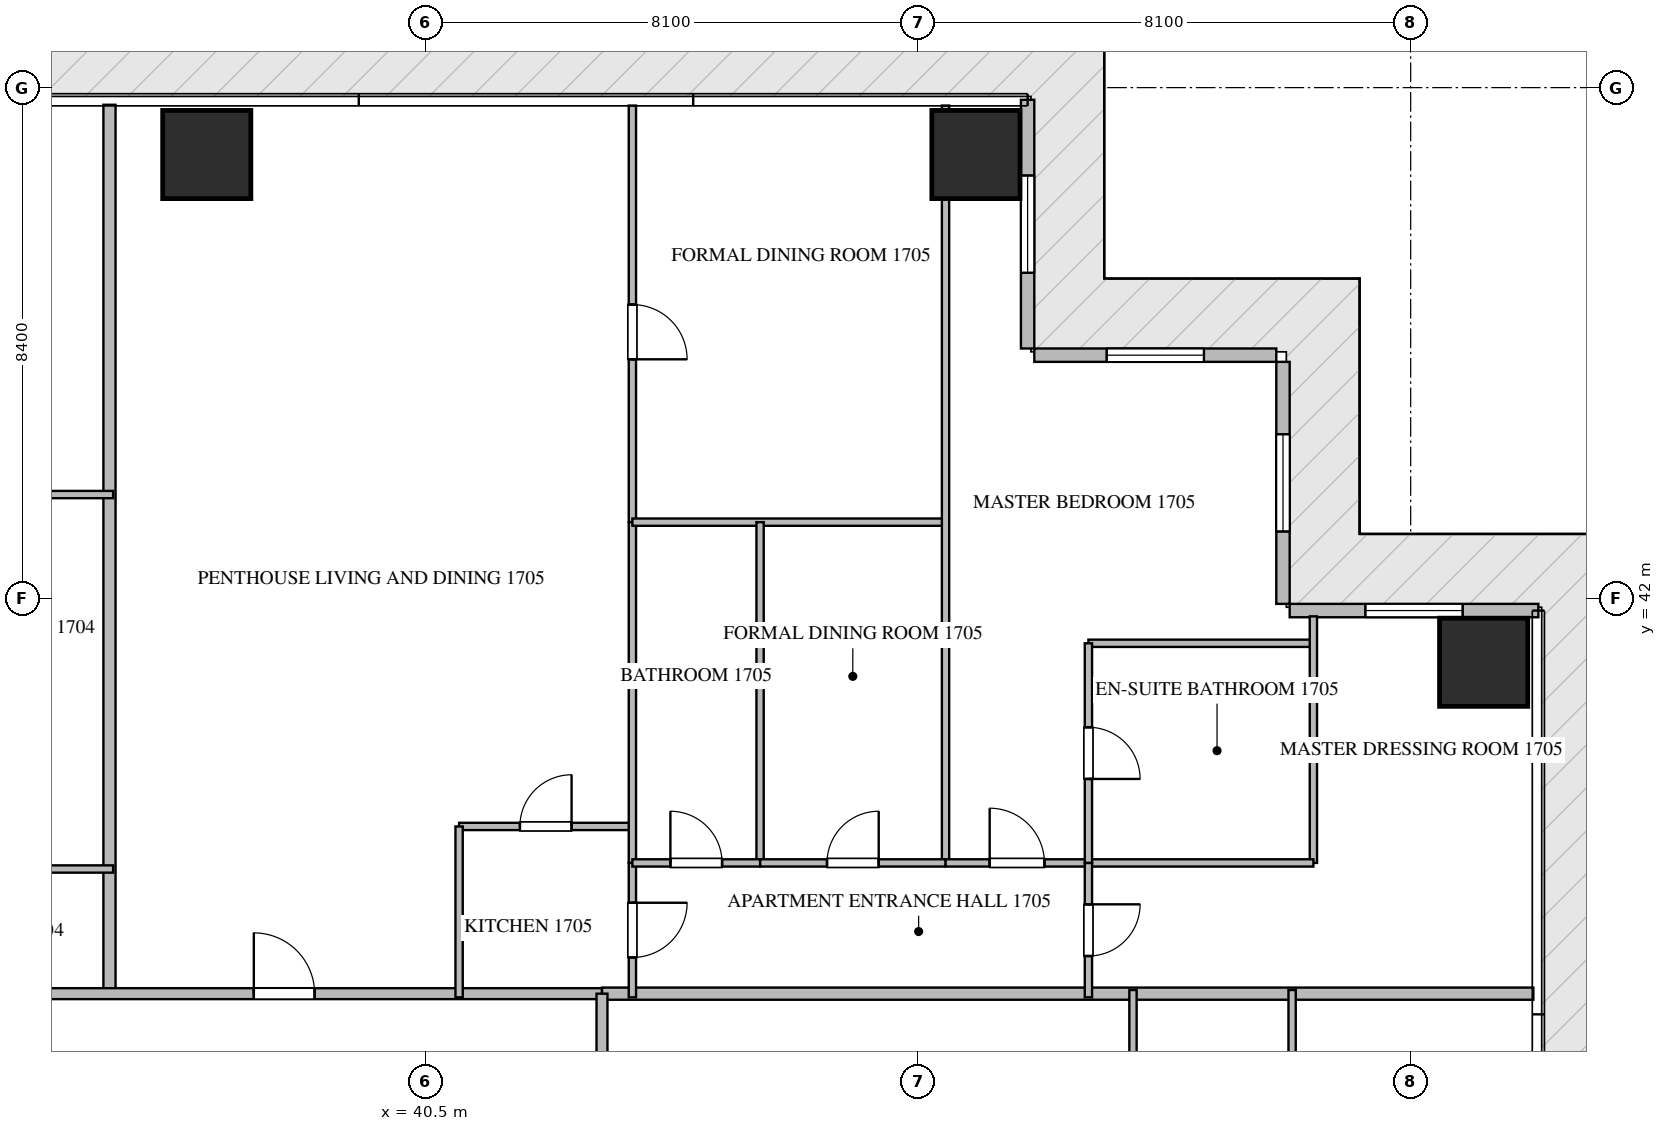
"""IFC4 building model, lengths in metres.
Left out: names, types, materials, properties, quantities, classifications, styles, units other than length and angle.
Written with IfcOpenShell. Run it as: python <this file> out.ifc"""

import sys

from ifc_helpers import new_model, si_unit, direction, frame, frame_2d, origin, origin_2d, place, context, subcontext, project, spatial, rectangle, extrude, source, transform, mapped, element, fill, save


model = new_model("IFC4")
c1 = context("Model", 3, precision=1e-05, world=origin(), true_north=direction((0.0, 1.0)))
c2 = subcontext(c1, "Body", "Model", "MODEL_VIEW")
j1 = project(units=[si_unit("LENGTHUNIT", "METRE"), si_unit("PLANEANGLEUNIT", "RADIAN")], contexts=[c1])
p1 = place(None, origin())
s1 = spatial("IfcSite", under=j1, at=p1, CompositionType="ELEMENT")
p2 = place(p1, origin())
s2 = spatial("IfcBuilding", under=s1, at=p2, CompositionType="ELEMENT")
p3 = place(p2, frame((0.0, 0.0, 71.7)))
s3 = spatial("IfcBuildingStorey", under=s2, at=p3, CompositionType="ELEMENT", Elevation=71.7)
m1 = source(origin(), c2, "Body", "SweptSolid", [
    extrude(rectangle(XDim=1.45, YDim=1.45, at=origin_2d()), origin(), (0.0, 0.0, 1.0), 3.75),
])
for number, where, z_axis, x_axis in (
    (1, (36.9, 49.3, -0.26), (0.0, 0.0, 1.0), (1.0, 0.0, 0.0)),
    (2, (49.55, 49.3, -0.26), (0.0, 0.0, 1.0), (1.0, 0.0, 0.0)),
    (3, (57.9, 40.95, -0.26), (0.0, 0.0, 1.0), (1.0, 0.0, 0.0)),
):
    element("IfcColumn", number, at=place(p3, frame(where, z_axis=z_axis, x_axis=x_axis)), inside=s3, PredefinedType="COLUMN", context=c2, shape_type="MappedRepresentation", body=[
        mapped(m1, transform((0.0, 0.0, 0.0), scale=1.0)),
    ])
p4 = place(p3, frame((58.8, 41.8, 0.0), z_axis=(0.0, 0.0, 1.0), x_axis=(-1.0, 0.0, 0.0)))
e4 = element("IfcWall", 4, at=p4, inside=s3, PredefinedType="ELEMENTEDWALL", context=c2, shape_type="SweptSolid", body=[
    extrude(rectangle(XDim=4.09, YDim=0.22, at=frame_2d((2.045, 0.0))), origin(), (0.0, 0.0, 1.0), 3.475),
])
p5 = place(p4, frame((1.245, 0.0, 0.65)))
e5 = element("IfcOpeningElement", 5, at=p5, cuts=e4, PredefinedType="OPENING", context=c2, shape_type="SweptSolid", body=[
    extrude(rectangle(XDim=1.6, YDim=2.1, at=frame_2d((0.8, 1.05))), frame((0.0, 0.12, 0.0), z_axis=(0.0, -1.0, 0.0), x_axis=(1.0, 0.0, 0.0)), (0.0, 0.0, 1.0), 0.24),
])
p6 = place(p3, frame((54.6, 41.91, 0.0), z_axis=(0.0, 0.0, 1.0), x_axis=(0.0, 1.0, 0.0)))
e6 = element("IfcWall", 6, at=p6, inside=s3, PredefinedType="ELEMENTEDWALL", context=c2, shape_type="SweptSolid", body=[
    extrude(rectangle(XDim=3.98, YDim=0.22, at=frame_2d((1.99, 0.0))), origin(), (0.0, 0.0, 1.0), 3.475),
])
p7 = place(p6, frame((1.19, 0.0, 0.65)))
e7 = element("IfcOpeningElement", 7, at=p7, cuts=e6, PredefinedType="OPENING", context=c2, shape_type="SweptSolid", body=[
    extrude(rectangle(XDim=1.6, YDim=2.1, at=frame_2d((0.8, 1.05))), frame((0.0, 0.12, 0.0), z_axis=(0.0, -1.0, 0.0), x_axis=(1.0, 0.0, 0.0)), (0.0, 0.0, 1.0), 0.24),
])
p8 = place(p3, frame((54.49, 46.0, 0.0), z_axis=(0.0, 0.0, 1.0), x_axis=(-1.0, 0.0, 0.0)))
e8 = element("IfcWall", 8, at=p8, inside=s3, PredefinedType="ELEMENTEDWALL", context=c2, shape_type="SweptSolid", body=[
    extrude(rectangle(XDim=3.98, YDim=0.22, at=frame_2d((1.99, 0.0))), origin(), (0.0, 0.0, 1.0), 3.475),
])
p9 = place(p8, frame((1.19, 0.0, 0.65)))
e9 = element("IfcOpeningElement", 9, at=p9, cuts=e8, PredefinedType="OPENING", context=c2, shape_type="SweptSolid", body=[
    extrude(rectangle(XDim=1.6, YDim=2.1, at=frame_2d((0.8, 1.05))), frame((0.0, 0.12, 0.0), z_axis=(0.0, -1.0, 0.0), x_axis=(1.0, 0.0, 0.0)), (0.0, 0.0, 1.0), 0.24),
])
p10 = place(p3, frame((50.4, 46.11, 0.0), z_axis=(0.0, 0.0, 1.0), x_axis=(0.0, 1.0, 0.0)))
e10 = element("IfcWall", 10, at=p10, inside=s3, PredefinedType="ELEMENTEDWALL", context=c2, shape_type="SweptSolid", body=[
    extrude(rectangle(XDim=4.09, YDim=0.22, at=frame_2d((2.045, 0.0))), origin(), (0.0, 0.0, 1.0), 3.475),
])
p11 = place(p10, frame((1.245, 0.0, 0.65)))
e11 = element("IfcOpeningElement", 11, at=p11, cuts=e10, PredefinedType="OPENING", context=c2, shape_type="SweptSolid", body=[
    extrude(rectangle(XDim=1.6, YDim=2.1, at=frame_2d((0.8, 1.05))), frame((0.0, 0.12, 0.0), z_axis=(0.0, -1.0, 0.0), x_axis=(1.0, 0.0, 0.0)), (0.0, 0.0, 1.0), 0.24),
])
p12 = place(p3, frame((35.3, 35.5, 0.0), z_axis=(0.0, 0.0, 1.0), x_axis=(0.0, 1.0, 0.0)))
e12 = element("IfcWall", 12, at=p12, inside=s3, PredefinedType="PARTITIONING", context=c2, shape_type="SweptSolid", body=[
    extrude(rectangle(XDim=14.618, YDim=0.2, at=frame_2d((7.309, 0.0))), origin(), (0.0, 0.0, 1.0), 3.49),
])
p13 = place(p3, frame((43.4, 35.5, 0.0), z_axis=(0.0, 0.0, 1.0), x_axis=(1.0, 0.0, 0.0)))
e13 = element("IfcWall", 13, at=p13, inside=s3, PredefinedType="PARTITIONING", context=c2, shape_type="SweptSolid", body=[
    extrude(rectangle(XDim=15.318, YDim=0.2, at=frame_2d((7.659, 0.0))), origin(), (0.0, 0.0, 1.0), 3.49),
])
p14 = place(p3, frame((21.402, 35.5, 0.0), z_axis=(0.0, 0.0, 1.0), x_axis=(1.0, 0.0, 0.0)))
e14 = element("IfcWall", 14, at=p14, inside=s3, PredefinedType="PARTITIONING", context=c2, shape_type="SweptSolid", body=[
    extrude(rectangle(XDim=21.996, YDim=0.18, at=frame_2d((10.998, 0.0))), origin(), (0.0, 0.0, 1.0), 3.49),
])
p15 = place(p14, frame((5.774, 0.0, 0.0)))
e15 = element("IfcOpeningElement", 15, at=p15, cuts=e14, PredefinedType="OPENING", context=c2, shape_type="SweptSolid", body=[
    extrude(rectangle(XDim=1.0, YDim=2.15, at=frame_2d((0.5, 1.075))), frame((0.0, 0.1, 0.0), z_axis=(0.0, -1.0, 0.0), x_axis=(1.0, 0.0, 0.0)), (0.0, 0.0, 1.0), 0.2),
])
p16 = place(p14, frame((16.272, 0.0, 0.0)))
e16 = element("IfcOpeningElement", 16, at=p16, cuts=e14, PredefinedType="OPENING", context=c2, shape_type="SweptSolid", body=[
    extrude(rectangle(XDim=1.0, YDim=2.15, at=frame_2d((0.5, 1.075))), frame((0.0, 0.1, 0.0), z_axis=(0.0, -1.0, 0.0), x_axis=(1.0, 0.0, 0.0)), (0.0, 0.0, 1.0), 0.2),
])
p17 = place(p3, frame((43.4, 14.9, 0.0), z_axis=(0.0, 0.0, 1.0), x_axis=(0.0, 1.0, 0.0)))
e17 = element("IfcWall", 17, at=p17, inside=s3, PredefinedType="PARTITIONING", context=c2, shape_type="SweptSolid", body=[
    extrude(rectangle(XDim=20.6, YDim=0.18, at=frame_2d((10.3, 0.0))), origin(), (0.0, 0.0, 1.0), 3.49),
])
p18 = place(p17, frame((1.96, 0.0, 0.0)))
e18 = element("IfcOpeningElement", 18, at=p18, cuts=e17, PredefinedType="OPENING", context=c2, shape_type="SweptSolid", body=[
    extrude(rectangle(XDim=1.0, YDim=2.15, at=frame_2d((0.5, 1.075))), frame((0.0, 0.1, 0.0), z_axis=(0.0, -1.0, 0.0), x_axis=(1.0, 0.0, 0.0)), (0.0, 0.0, 1.0), 0.2),
])
for number, where, z_axis, x_axis in (
    (19, (30.56, 43.708, 0.0), (0.0, 0.0, 1.0), (1.0, 0.0, 0.0)),
    (20, (30.56, 37.55, 0.0), (0.0, 0.0, 1.0), (1.0, 0.0, 0.0)),
):
    element("IfcWall", number, at=place(p3, frame(where, z_axis=z_axis, x_axis=x_axis)), inside=s3, PredefinedType="PARTITIONING", context=c2, shape_type="SweptSolid", body=[
        extrude(rectangle(XDim=4.8, YDim=0.12, at=frame_2d((2.4, 0.0))), origin(), (0.0, 0.0, 1.0), 3.49),
    ])
p19 = place(p3, frame((41.05, 38.25, 0.0), z_axis=(0.0, 0.0, 1.0), x_axis=(1.0, 0.0, 0.0)))
e21 = element("IfcWall", 21, at=p19, inside=s3, PredefinedType="PARTITIONING", context=c2, shape_type="SweptSolid", body=[
    extrude(rectangle(XDim=2.85, YDim=0.12, at=frame_2d((1.425, 0.0))), origin(), (0.0, 0.0, 1.0), 3.49),
])
p20 = place(p19, frame((1.0, 0.0, 0.0)))
e22 = element("IfcOpeningElement", 22, at=p20, cuts=e21, PredefinedType="OPENING", context=c2, shape_type="SweptSolid", body=[
    extrude(rectangle(XDim=0.85, YDim=2.1, at=frame_2d((0.425, 1.05))), frame((0.0, 0.07, 0.0), z_axis=(0.0, -1.0, 0.0), x_axis=(1.0, 0.0, 0.0)), (0.0, 0.0, 1.0), 0.14),
])
p21 = place(p3, frame((41.05, 38.25, 0.0), z_axis=(0.0, 0.0, 1.0), x_axis=(0.0, -1.0, 0.0)))
e23 = element("IfcWall", 23, at=p21, inside=s3, PredefinedType="PARTITIONING", context=c2, shape_type="SweptSolid", body=[
    extrude(rectangle(XDim=2.81, YDim=0.12, at=frame_2d((1.405, 0.0))), origin(), (0.0, 0.0, 1.0), 3.49),
])
p22 = place(p3, frame((43.9, 37.65, 0.0), z_axis=(0.0, 0.0, 1.0), x_axis=(0.0, -1.0, 0.0)))
e24 = element("IfcWall", 24, at=p22, inside=s3, PredefinedType="PARTITIONING", context=c2, shape_type="SweptSolid", body=[
    extrude(rectangle(XDim=2.21, YDim=0.12, at=frame_2d((1.105, 0.0))), origin(), (0.0, 0.0, 1.0), 3.49),
])
p23 = place(p22, frame((0.655, 0.0, 0.0)))
e25 = element("IfcOpeningElement", 25, at=p23, cuts=e24, PredefinedType="OPENING", context=c2, shape_type="SweptSolid", body=[
    extrude(rectangle(XDim=0.9, YDim=2.1, at=frame_2d((0.45, 1.05))), frame((0.0, 0.07, 0.0), z_axis=(0.0, -1.0, 0.0), x_axis=(1.0, 0.0, 0.0)), (0.0, 0.0, 1.0), 0.14),
])
p24 = place(p3, frame((43.9, 50.105, 0.0), z_axis=(0.0, 0.0, 1.0), x_axis=(0.0, -1.0, 0.0)))
e26 = element("IfcWall", 26, at=p24, inside=s3, PredefinedType="PARTITIONING", context=c2, shape_type="SweptSolid", body=[
    extrude(rectangle(XDim=6.851, YDim=0.12, at=frame_2d((3.426, 0.0))), origin(), (0.0, 0.0, 1.0), 3.49),
])
p25 = place(p24, frame((3.273, 0.0, 0.0)))
e27 = element("IfcOpeningElement", 27, at=p25, cuts=e26, PredefinedType="OPENING", context=c2, shape_type="SweptSolid", body=[
    extrude(rectangle(XDim=0.9, YDim=2.1, at=frame_2d((0.45, 1.05))), frame((0.0, 0.07, 0.0), z_axis=(0.0, -1.0, 0.0), x_axis=(1.0, 0.0, 0.0)), (0.0, 0.0, 1.0), 0.14),
])
p26 = place(p3, frame((43.9, 43.252, 0.0), z_axis=(0.0, 0.0, 1.0), x_axis=(0.0, -1.0, 0.0)))
e28 = element("IfcWall", 28, at=p26, inside=s3, PredefinedType="PARTITIONING", context=c2, shape_type="SweptSolid", body=[
    extrude(rectangle(XDim=5.6, YDim=0.12, at=frame_2d((2.8, 0.0))), origin(), (0.0, 0.0, 1.0), 3.49),
])
p27 = place(p3, frame((43.9, 43.254, 0.0), z_axis=(0.0, 0.0, 1.0), x_axis=(1.0, 0.0, 0.0)))
e29 = element("IfcWall", 29, at=p27, inside=s3, PredefinedType="PARTITIONING", context=c2, shape_type="SweptSolid", body=[
    extrude(rectangle(XDim=5.15, YDim=0.12, at=frame_2d((2.575, 0.0))), origin(), (0.0, 0.0, 1.0), 3.49),
])
p28 = place(p3, frame((49.05, 50.105, 0.0), z_axis=(0.0, 0.0, 1.0), x_axis=(0.0, -1.0, 0.0)))
e30 = element("IfcWall", 30, at=p28, inside=s3, PredefinedType="PARTITIONING", context=c2, shape_type="SweptSolid", body=[
    extrude(rectangle(XDim=12.455, YDim=0.12, at=frame_2d((6.228, 0.0))), origin(), (0.0, 0.0, 1.0), 3.49),
])
p29 = place(p3, frame((46.0, 43.254, 0.0), z_axis=(0.0, 0.0, 1.0), x_axis=(0.0, -1.0, 0.0)))
e31 = element("IfcWall", 31, at=p29, inside=s3, PredefinedType="PARTITIONING", context=c2, shape_type="SweptSolid", body=[
    extrude(rectangle(XDim=5.604, YDim=0.12, at=frame_2d((2.802, 0.0))), origin(), (0.0, 0.0, 1.0), 3.49),
])
p30 = place(p3, frame((43.9, 37.65, 0.0), z_axis=(0.0, 0.0, 1.0), x_axis=(1.0, 0.0, 0.0)))
e32 = element("IfcWall", 32, at=p30, inside=s3, PredefinedType="PARTITIONING", context=c2, shape_type="SweptSolid", body=[
    extrude(rectangle(XDim=2.1, YDim=0.12, at=frame_2d((1.05, 0.0))), origin(), (0.0, 0.0, 1.0), 3.49),
])
p31 = place(p30, frame((0.625, 0.0, 0.0)))
e33 = element("IfcOpeningElement", 33, at=p31, cuts=e32, PredefinedType="OPENING", context=c2, shape_type="SweptSolid", body=[
    extrude(rectangle(XDim=0.85, YDim=2.1, at=frame_2d((0.425, 1.05))), frame((0.0, 0.07, 0.0), z_axis=(0.0, -1.0, 0.0), x_axis=(1.0, 0.0, 0.0)), (0.0, 0.0, 1.0), 0.14),
])
p32 = place(p3, frame((46.002, 37.65, 0.0), z_axis=(0.0, 0.0, 1.0), x_axis=(1.0, 0.0, 0.0)))
e34 = element("IfcWall", 34, at=p32, inside=s3, PredefinedType="PARTITIONING", context=c2, shape_type="SweptSolid", body=[
    extrude(rectangle(XDim=3.048, YDim=0.12, at=frame_2d((1.524, 0.0))), origin(), (0.0, 0.0, 1.0), 3.49),
])
p33 = place(p32, frame((1.099, 0.0, 0.0)))
e35 = element("IfcOpeningElement", 35, at=p33, cuts=e34, PredefinedType="OPENING", context=c2, shape_type="SweptSolid", body=[
    extrude(rectangle(XDim=0.85, YDim=2.1, at=frame_2d((0.425, 1.05))), frame((0.0, 0.07, 0.0), z_axis=(0.0, -1.0, 0.0), x_axis=(1.0, 0.0, 0.0)), (0.0, 0.0, 1.0), 0.14),
])
p34 = place(p3, frame((49.052, 37.65, 0.0), z_axis=(0.0, 0.0, 1.0), x_axis=(1.0, 0.0, 0.0)))
e36 = element("IfcWall", 36, at=p34, inside=s3, PredefinedType="PARTITIONING", context=c2, shape_type="SweptSolid", body=[
    extrude(rectangle(XDim=2.348, YDim=0.12, at=frame_2d((1.174, 0.0))), origin(), (0.0, 0.0, 1.0), 3.49),
])
p35 = place(p34, frame((0.724, 0.0, 0.0)))
e37 = element("IfcOpeningElement", 37, at=p35, cuts=e36, PredefinedType="OPENING", context=c2, shape_type="SweptSolid", body=[
    extrude(rectangle(XDim=0.9, YDim=2.1, at=frame_2d((0.45, 1.05))), frame((0.0, 0.07, 0.0), z_axis=(0.0, -1.0, 0.0), x_axis=(1.0, 0.0, 0.0)), (0.0, 0.0, 1.0), 0.14),
])
p36 = place(p3, frame((51.4, 41.262, 0.0), z_axis=(0.0, 0.0, 1.0), x_axis=(1.0, 0.0, 0.0)))
e38 = element("IfcWall", 38, at=p36, inside=s3, PredefinedType="PARTITIONING", context=c2, shape_type="SweptSolid", body=[
    extrude(rectangle(XDim=3.7, YDim=0.12, at=frame_2d((1.85, 0.0))), origin(), (0.0, 0.0, 1.0), 3.49),
])
p37 = place(p3, frame((55.1, 41.705, 0.0), z_axis=(0.0, 0.0, 1.0), x_axis=(0.0, -1.0, 0.0)))
e39 = element("IfcWall", 39, at=p37, inside=s3, PredefinedType="PARTITIONING", context=c2, shape_type="SweptSolid", body=[
    extrude(rectangle(XDim=4.055, YDim=0.12, at=frame_2d((2.028, 0.0))), origin(), (0.0, 0.0, 1.0), 3.49),
])
p38 = place(p3, frame((51.402, 37.65, 0.0), z_axis=(0.0, 0.0, 1.0), x_axis=(1.0, 0.0, 0.0)))
e40 = element("IfcWall", 40, at=p38, inside=s3, PredefinedType="PARTITIONING", context=c2, shape_type="SweptSolid", body=[
    extrude(rectangle(XDim=3.698, YDim=0.12, at=frame_2d((1.849, 0.0))), origin(), (0.0, 0.0, 1.0), 3.49),
])
p39 = place(p3, frame((51.4, 41.262, 0.0), z_axis=(0.0, 0.0, 1.0), x_axis=(0.0, -1.0, 0.0)))
e41 = element("IfcWall", 41, at=p39, inside=s3, PredefinedType="PARTITIONING", context=c2, shape_type="SweptSolid", body=[
    extrude(rectangle(XDim=3.612, YDim=0.12, at=frame_2d((1.806, 0.0))), origin(), (0.0, 0.0, 1.0), 3.49),
])
p40 = place(p39, frame((1.381, 0.0, 0.0)))
e42 = element("IfcOpeningElement", 42, at=p40, cuts=e41, PredefinedType="OPENING", context=c2, shape_type="SweptSolid", body=[
    extrude(rectangle(XDim=0.85, YDim=2.1, at=frame_2d((0.425, 1.05))), frame((0.0, 0.07, 0.0), z_axis=(0.0, -1.0, 0.0), x_axis=(1.0, 0.0, 0.0)), (0.0, 0.0, 1.0), 0.14),
])
p41 = place(p3, frame((51.4, 37.648, 0.0), z_axis=(0.0, 0.0, 1.0), x_axis=(0.0, -1.0, 0.0)))
e43 = element("IfcWall", 43, at=p41, inside=s3, PredefinedType="PARTITIONING", context=c2, shape_type="SweptSolid", body=[
    extrude(rectangle(XDim=2.208, YDim=0.12, at=frame_2d((1.104, 0.0))), origin(), (0.0, 0.0, 1.0), 3.49),
])
p42 = place(p41, frame((0.679, 0.0, 0.0)))
e44 = element("IfcOpeningElement", 44, at=p42, cuts=e43, PredefinedType="OPENING", context=c2, shape_type="SweptSolid", body=[
    extrude(rectangle(XDim=0.85, YDim=2.1, at=frame_2d((0.425, 1.05))), frame((0.0, 0.07, 0.0), z_axis=(0.0, -1.0, 0.0), x_axis=(1.0, 0.0, 0.0)), (0.0, 0.0, 1.0), 0.14),
])
for number, where, z_axis, x_axis in (
    (45, (54.75, 30.15, 0.0), (0.0, 0.0, 1.0), (0.0, 1.0, 0.0)),
    (46, (52.133, 30.15, 0.0), (0.0, 0.0, 1.0), (0.0, 1.0, 0.0)),
):
    element("IfcWall", number, at=place(p3, frame(where, z_axis=z_axis, x_axis=x_axis)), inside=s3, PredefinedType="PARTITIONING", context=c2, shape_type="SweptSolid", body=[
        extrude(rectangle(XDim=5.41, YDim=0.12, at=frame_2d((2.705, 0.0))), origin(), (0.0, 0.0, 1.0), 3.49),
    ])
m2 = source(origin(), c2, "Body", "SweptSolid", [
    extrude(rectangle(XDim=1.6, YDim=2.1, at=frame_2d((0.8, 1.05))), frame((0.0, 0.03, 0.0), z_axis=(0.0, -1.0, 0.0), x_axis=(1.0, 0.0, 0.0)), (0.0, 0.0, 1.0), 0.06),
])
p43 = place(p5, origin())
e47 = element("IfcWindow", 47, at=p43, inside=s3, PartitioningType="SINGLE_PANEL", PredefinedType="WINDOW", context=c2, shape_type="MappedRepresentation", body=[
    mapped(m2, transform((0.0, 0.0, 0.0), scale=1.0)),
])
fill(e5, e47)
p44 = place(p7, origin())
e48 = element("IfcWindow", 48, at=p44, inside=s3, PartitioningType="SINGLE_PANEL", PredefinedType="WINDOW", context=c2, shape_type="MappedRepresentation", body=[
    mapped(m2, transform((0.0, 0.0, 0.0), scale=1.0)),
])
fill(e7, e48)
p45 = place(p9, origin())
e49 = element("IfcWindow", 49, at=p45, inside=s3, PartitioningType="SINGLE_PANEL", PredefinedType="WINDOW", context=c2, shape_type="MappedRepresentation", body=[
    mapped(m2, transform((0.0, 0.0, 0.0), scale=1.0)),
])
fill(e9, e49)
p46 = place(p11, origin())
e50 = element("IfcWindow", 50, at=p46, inside=s3, PartitioningType="SINGLE_PANEL", PredefinedType="WINDOW", context=c2, shape_type="MappedRepresentation", body=[
    mapped(m2, transform((0.0, 0.0, 0.0), scale=1.0)),
])
fill(e11, e50)
m3 = source(origin(), c2, "Body", "SweptSolid", [
    extrude(rectangle(XDim=1.0, YDim=2.15, at=frame_2d((0.5, 1.075))), frame((0.0, 0.025, 0.0), z_axis=(0.0, -1.0, 0.0), x_axis=(1.0, 0.0, 0.0)), (0.0, 0.0, 1.0), 0.05),
])
p47 = place(p16, origin())
e51 = element("IfcDoor", 51, at=p47, inside=s3, OperationType="SINGLE_SWING_LEFT", PredefinedType="DOOR", context=c2, shape_type="MappedRepresentation", body=[
    mapped(m3, transform((0.0, 0.0, 0.0), scale=1.0)),
])
fill(e16, e51)
m4 = source(origin(), c2, "Body", "SweptSolid", [
    extrude(rectangle(XDim=0.85, YDim=2.1, at=frame_2d((0.425, 1.05))), frame((0.0, 0.025, 0.0), z_axis=(0.0, -1.0, 0.0), x_axis=(1.0, 0.0, 0.0)), (0.0, 0.0, 1.0), 0.05),
])
p48 = place(p20, origin())
e52 = element("IfcDoor", 52, at=p48, inside=s3, OperationType="SINGLE_SWING_RIGHT", PredefinedType="DOOR", context=c2, shape_type="MappedRepresentation", body=[
    mapped(m4, transform((0.0, 0.0, 0.0), scale=1.0)),
])
fill(e22, e52)
m5 = source(origin(), c2, "Body", "SweptSolid", [
    extrude(rectangle(XDim=0.9, YDim=2.1, at=frame_2d((0.45, 1.05))), frame((0.0, 0.025, 0.0), z_axis=(0.0, -1.0, 0.0), x_axis=(1.0, 0.0, 0.0)), (0.0, 0.0, 1.0), 0.05),
])
p49 = place(p23, origin())
e53 = element("IfcDoor", 53, at=p49, inside=s3, OperationType="SINGLE_SWING_LEFT", PredefinedType="DOOR", context=c2, shape_type="MappedRepresentation", body=[
    mapped(m5, transform((0.0, 0.0, 0.0), scale=1.0)),
])
fill(e25, e53)
p50 = place(p25, origin())
e54 = element("IfcDoor", 54, at=p50, inside=s3, OperationType="SINGLE_SWING_RIGHT", PredefinedType="DOOR", context=c2, shape_type="MappedRepresentation", body=[
    mapped(m5, transform((0.0, 0.0, 0.0), scale=1.0)),
])
fill(e27, e54)
p51 = place(p31, origin())
e55 = element("IfcDoor", 55, at=p51, inside=s3, OperationType="SINGLE_SWING_LEFT", PredefinedType="DOOR", context=c2, shape_type="MappedRepresentation", body=[
    mapped(m4, transform((0.0, 0.0, 0.0), scale=1.0)),
])
fill(e33, e55)
p52 = place(p33, origin())
e56 = element("IfcDoor", 56, at=p52, inside=s3, OperationType="SINGLE_SWING_RIGHT", PredefinedType="DOOR", context=c2, shape_type="MappedRepresentation", body=[
    mapped(m4, transform((0.0, 0.0, 0.0), scale=1.0)),
])
fill(e35, e56)
p53 = place(p35, origin())
e57 = element("IfcDoor", 57, at=p53, inside=s3, OperationType="SINGLE_SWING_LEFT", PredefinedType="DOOR", context=c2, shape_type="MappedRepresentation", body=[
    mapped(m5, transform((0.0, 0.0, 0.0), scale=1.0)),
])
fill(e37, e57)
p54 = place(p40, origin())
e58 = element("IfcDoor", 58, at=p54, inside=s3, OperationType="SINGLE_SWING_RIGHT", PredefinedType="DOOR", context=c2, shape_type="MappedRepresentation", body=[
    mapped(m4, transform((0.0, 0.0, 0.0), scale=1.0)),
])
fill(e42, e58)
p55 = place(p42, origin())
e59 = element("IfcDoor", 59, at=p55, inside=s3, OperationType="SINGLE_SWING_LEFT", PredefinedType="DOOR", context=c2, shape_type="MappedRepresentation", body=[
    mapped(m4, transform((0.0, 0.0, 0.0), scale=1.0)),
])
fill(e44, e59)
save(model, sys.argv[1])
